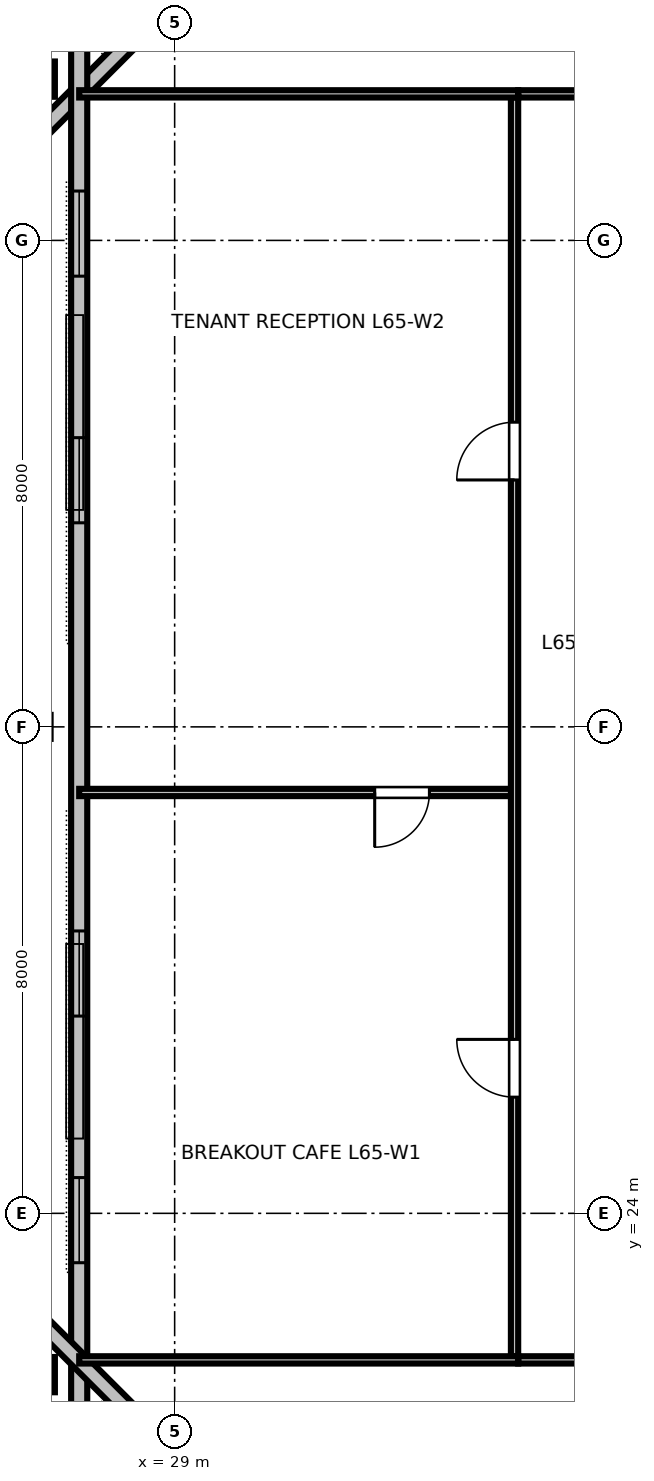
"""IFC4 building model, lengths in metres.
Left out: names, types, materials, properties, quantities, classifications, styles, units other than length and angle.
Written with IfcOpenShell. Run it as: python <this file> out.ifc"""

import sys

from ifc_helpers import new_model, si_unit, direction, frame, frame_2d, origin, origin_2d, place, context, subcontext, project, spatial, rectangle, hollow_rectangle, i_section, extrude, element, fill, save


model = new_model("IFC4")
c1 = context("Model", 3, precision=1e-05, world=origin(), true_north=direction((0.0, 1.0)))
c2 = subcontext(c1, "Body", "Model", "MODEL_VIEW")
j1 = project(units=[si_unit("LENGTHUNIT", "METRE"), si_unit("PLANEANGLEUNIT", "RADIAN")], contexts=[c1])
p1 = place(None, origin())
s1 = spatial("IfcSite", under=j1, at=p1, CompositionType="ELEMENT")
p2 = place(p1, origin())
s2 = spatial("IfcBuilding", under=s1, at=p2, CompositionType="ELEMENT")
p3 = place(p2, frame((0.0, 0.0, 246.6)))
s3 = spatial("IfcBuildingStorey", under=s2, at=p3, CompositionType="ELEMENT", Elevation=246.6)
p4 = place(p3, frame((26.68, 42.652, 0.0), z_axis=(0.177670579794, -0.155655183327, 0.971701923935), x_axis=(-0.730885754555, 0.640320734295, 0.236210438002)))
e1 = element("IfcColumn", 1, at=p4, inside=s3, PredefinedType="COLUMN", context=c2, shape_type="SweptSolid", body=[
    extrude(hollow_rectangle(XDim=0.58, YDim=0.7, WallThickness=0.032, at=origin_2d()), origin(), (0.0, 0.0, 1.0), 3.471),
])
p5 = place(p3, frame((26.77, 32.0, 0.0), z_axis=(0.178966909192, 0.0, 0.983855093708), x_axis=(-0.983855093708, 0.0, 0.178966909192)))
e2 = element("IfcColumn", 2, at=p5, inside=s3, PredefinedType="COLUMN", context=c2, shape_type="SweptSolid", body=[
    extrude(i_section(OverallWidth=0.395, OverallDepth=0.38, WebThickness=0.019, FlangeThickness=0.03, FilletRadius=0.025, at=origin_2d()), origin(), (0.0, 0.0, 1.0), 3.428),
])
p6 = place(p3, frame((26.68, 21.348, 0.0), z_axis=(0.177670579794, 0.155655183327, 0.971701923935), x_axis=(-0.730885754555, -0.640320734295, 0.236210438002)))
e3 = element("IfcColumn", 3, at=p6, inside=s3, PredefinedType="COLUMN", context=c2, shape_type="SweptSolid", body=[
    extrude(hollow_rectangle(XDim=0.58, YDim=0.7, WallThickness=0.032, at=origin_2d()), origin(), (0.0, 0.0, 1.0), 3.471),
])
p7 = place(p3, frame((34.396, 49.394, 0.0), z_axis=(0.0, 0.0, 1.0), x_axis=(-0.707106781187, -0.707106781187, 0.0)))
e4 = element("IfcWall", 4, at=p7, inside=s3, PredefinedType="STANDARD", context=c2, shape_type="SweptSolid", body=[
    extrude(rectangle(XDim=10.662, YDim=0.265, at=frame_2d((5.331, 0.0))), origin(), (0.0, 0.0, 1.0), 2.832),
])
p8 = place(p3, frame((27.43, 43.24, 0.0), z_axis=(0.0, 0.0, 1.0), x_axis=(0.0, -1.0, 0.0)))
e5 = element("IfcWall", 5, at=p8, inside=s3, PredefinedType="STANDARD", context=c2, shape_type="SweptSolid", body=[
    extrude(rectangle(XDim=22.48, YDim=0.265, at=frame_2d((11.24, 0.0))), origin(), (0.0, 0.0, 1.0), 2.832),
])
p9 = place(p8, frame((2.428, 0.0, 0.85)))
e6 = element("IfcOpeningElement", 6, at=p9, cuts=e5, PredefinedType="OPENING", context=c2, shape_type="SweptSolid", body=[
    extrude(rectangle(XDim=1.4, YDim=1.2, at=frame_2d((0.7, 0.6))), frame((0.0, 0.142, 0.0), z_axis=(0.0, -1.0, 0.0), x_axis=(1.0, 0.0, 0.0)), (0.0, 0.0, 1.0), 0.285),
])
p10 = place(p8, frame((6.484, 0.0, 0.85)))
e7 = element("IfcOpeningElement", 7, at=p10, cuts=e5, PredefinedType="OPENING", context=c2, shape_type="SweptSolid", body=[
    extrude(rectangle(XDim=1.4, YDim=1.2, at=frame_2d((0.7, 0.6))), frame((0.0, 0.142, 0.0), z_axis=(0.0, -1.0, 0.0), x_axis=(1.0, 0.0, 0.0)), (0.0, 0.0, 1.0), 0.285),
])
p11 = place(p8, frame((14.596, 0.0, 0.85)))
e8 = element("IfcOpeningElement", 8, at=p11, cuts=e5, PredefinedType="OPENING", context=c2, shape_type="SweptSolid", body=[
    extrude(rectangle(XDim=1.4, YDim=1.2, at=frame_2d((0.7, 0.6))), frame((0.0, 0.142, 0.0), z_axis=(0.0, -1.0, 0.0), x_axis=(1.0, 0.0, 0.0)), (0.0, 0.0, 1.0), 0.285),
])
p12 = place(p8, frame((18.652, 0.0, 0.85)))
e9 = element("IfcOpeningElement", 9, at=p12, cuts=e5, PredefinedType="OPENING", context=c2, shape_type="SweptSolid", body=[
    extrude(rectangle(XDim=1.4, YDim=1.2, at=frame_2d((0.7, 0.6))), frame((0.0, 0.142, 0.0), z_axis=(0.0, -1.0, 0.0), x_axis=(1.0, 0.0, 0.0)), (0.0, 0.0, 1.0), 0.285),
])
p13 = place(p3, frame((26.856, 22.146, 0.0), z_axis=(0.0, 0.0, 1.0), x_axis=(0.707106781187, -0.707106781187, 0.0)))
e10 = element("IfcWall", 10, at=p13, inside=s3, PredefinedType="STANDARD", context=c2, shape_type="SweptSolid", body=[
    extrude(rectangle(XDim=10.662, YDim=0.265, at=frame_2d((5.331, 0.0))), origin(), (0.0, 0.0, 1.0), 2.832),
])
p14 = place(p3, frame((34.65, 21.59, 0.0), z_axis=(0.0, 0.0, 1.0), x_axis=(1.0, 0.0, 0.0)))
e11 = element("IfcWall", 11, at=p14, inside=s3, PredefinedType="PARTITIONING", context=c2, shape_type="SweptSolid", body=[
    extrude(rectangle(XDim=10.33, YDim=0.12, at=frame_2d((5.165, 0.0))), origin(), (0.0, 0.0, 1.0), 2.655),
])
p15 = place(p14, frame((3.55, 0.0, 0.0)))
e12 = element("IfcOpeningElement", 12, at=p15, cuts=e11, PredefinedType="OPENING", context=c2, shape_type="SweptSolid", body=[
    extrude(rectangle(XDim=0.95, YDim=2.15, at=frame_2d((0.475, 1.075))), frame((0.0, 0.07, 0.0), z_axis=(0.0, -1.0, 0.0), x_axis=(1.0, 0.0, 0.0)), (0.0, 0.0, 1.0), 0.14),
])
p16 = place(p3, frame((34.65, 42.41, 0.0), z_axis=(0.0, 0.0, 1.0), x_axis=(1.0, 0.0, 0.0)))
e13 = element("IfcWall", 13, at=p16, inside=s3, PredefinedType="PARTITIONING", context=c2, shape_type="SweptSolid", body=[
    extrude(rectangle(XDim=10.33, YDim=0.12, at=frame_2d((5.165, 0.0))), origin(), (0.0, 0.0, 1.0), 2.655),
])
p17 = place(p16, frame((2.695, 0.0, 0.0)))
e14 = element("IfcOpeningElement", 14, at=p17, cuts=e13, PredefinedType="OPENING", context=c2, shape_type="SweptSolid", body=[
    extrude(rectangle(XDim=0.95, YDim=2.15, at=frame_2d((0.475, 1.075))), frame((0.0, 0.07, 0.0), z_axis=(0.0, -1.0, 0.0), x_axis=(1.0, 0.0, 0.0)), (0.0, 0.0, 1.0), 0.14),
])
p18 = place(p16, frame((7.79, 0.0, 0.0)))
e15 = element("IfcOpeningElement", 15, at=p18, cuts=e13, PredefinedType="OPENING", context=c2, shape_type="SweptSolid", body=[
    extrude(rectangle(XDim=0.95, YDim=2.15, at=frame_2d((0.475, 1.075))), frame((0.0, 0.07, 0.0), z_axis=(0.0, -1.0, 0.0), x_axis=(1.0, 0.0, 0.0)), (0.0, 0.0, 1.0), 0.14),
])
p19 = place(p3, frame((34.59, 30.921, 0.0), z_axis=(0.0, 0.0, 1.0), x_axis=(-1.0, 0.0, 0.0)))
e16 = element("IfcWall", 16, at=p19, inside=s3, PredefinedType="PARTITIONING", context=c2, shape_type="SweptSolid", body=[
    extrude(rectangle(XDim=7.16, YDim=0.12, at=frame_2d((3.58, 0.0))), origin(), (0.0, 0.0, 1.0), 2.655),
])
p20 = place(p19, frame((1.4, 0.0, 0.0)))
e17 = element("IfcOpeningElement", 17, at=p20, cuts=e16, PredefinedType="OPENING", context=c2, shape_type="SweptSolid", body=[
    extrude(rectangle(XDim=0.9, YDim=2.15, at=frame_2d((0.45, 1.075))), frame((0.0, 0.07, 0.0), z_axis=(0.0, -1.0, 0.0), x_axis=(1.0, 0.0, 0.0)), (0.0, 0.0, 1.0), 0.14),
])
p21 = place(p3, frame((34.59, 21.65, 0.0), z_axis=(0.0, 0.0, 1.0), x_axis=(0.0, 1.0, 0.0)))
e18 = element("IfcWall", 18, at=p21, inside=s3, PredefinedType="PARTITIONING", context=c2, shape_type="SweptSolid", body=[
    extrude(rectangle(XDim=20.7, YDim=0.12, at=frame_2d((10.35, 0.0))), origin(), (0.0, 0.0, 1.0), 2.655),
])
p22 = place(p21, frame((4.26, 0.0, 0.0)))
e19 = element("IfcOpeningElement", 19, at=p22, cuts=e18, PredefinedType="OPENING", context=c2, shape_type="SweptSolid", body=[
    extrude(rectangle(XDim=0.95, YDim=2.15, at=frame_2d((0.475, 1.075))), frame((0.0, 0.07, 0.0), z_axis=(0.0, -1.0, 0.0), x_axis=(1.0, 0.0, 0.0)), (0.0, 0.0, 1.0), 0.14),
])
p23 = place(p21, frame((14.411, 0.0, 0.0)))
e20 = element("IfcOpeningElement", 20, at=p23, cuts=e18, PredefinedType="OPENING", context=c2, shape_type="SweptSolid", body=[
    extrude(rectangle(XDim=0.95, YDim=2.15, at=frame_2d((0.475, 1.075))), frame((0.0, 0.07, 0.0), z_axis=(0.0, -1.0, 0.0), x_axis=(1.0, 0.0, 0.0)), (0.0, 0.0, 1.0), 0.14),
])
for number, where, z_axis, x_axis in (
    (21, (34.65, 21.59, 0.0), (0.0, 0.0, 1.0), (-1.0, 0.0, 0.0)),
    (22, (34.65, 42.41, 0.0), (0.0, 0.0, 1.0), (-1.0, 0.0, 0.0)),
):
    element("IfcWall", number, at=place(p3, frame(where, z_axis=z_axis, x_axis=x_axis)), inside=s3, PredefinedType="PARTITIONING", context=c2, shape_type="SweptSolid", body=[
        extrude(rectangle(XDim=7.22, YDim=0.12, at=frame_2d((3.61, 0.0))), origin(), (0.0, 0.0, 1.0), 2.655),
    ])
p24 = place(p9, origin())
e23 = element("IfcWindow", 23, at=p24, inside=s3, PartitioningType="SINGLE_PANEL", PredefinedType="WINDOW", context=c2, shape_type="SweptSolid", body=[
    extrude(rectangle(XDim=1.4, YDim=1.2, at=frame_2d((0.7, 0.6))), frame((0.0, 0.03, 0.0), z_axis=(0.0, -1.0, 0.0), x_axis=(1.0, 0.0, 0.0)), (0.0, 0.0, 1.0), 0.06),
])
fill(e6, e23)
p25 = place(p10, origin())
e24 = element("IfcWindow", 24, at=p25, inside=s3, PartitioningType="SINGLE_PANEL", PredefinedType="WINDOW", context=c2, shape_type="SweptSolid", body=[
    extrude(rectangle(XDim=1.4, YDim=1.2, at=frame_2d((0.7, 0.6))), frame((0.0, 0.03, 0.0), z_axis=(0.0, -1.0, 0.0), x_axis=(1.0, 0.0, 0.0)), (0.0, 0.0, 1.0), 0.06),
])
fill(e7, e24)
p26 = place(p11, origin())
e25 = element("IfcWindow", 25, at=p26, inside=s3, PartitioningType="SINGLE_PANEL", PredefinedType="WINDOW", context=c2, shape_type="SweptSolid", body=[
    extrude(rectangle(XDim=1.4, YDim=1.2, at=frame_2d((0.7, 0.6))), frame((0.0, 0.03, 0.0), z_axis=(0.0, -1.0, 0.0), x_axis=(1.0, 0.0, 0.0)), (0.0, 0.0, 1.0), 0.06),
])
fill(e8, e25)
p27 = place(p12, origin())
e26 = element("IfcWindow", 26, at=p27, inside=s3, PartitioningType="SINGLE_PANEL", PredefinedType="WINDOW", context=c2, shape_type="SweptSolid", body=[
    extrude(rectangle(XDim=1.4, YDim=1.2, at=frame_2d((0.7, 0.6))), frame((0.0, 0.03, 0.0), z_axis=(0.0, -1.0, 0.0), x_axis=(1.0, 0.0, 0.0)), (0.0, 0.0, 1.0), 0.06),
])
fill(e9, e26)
p28 = place(p20, origin())
e27 = element("IfcDoor", 27, at=p28, inside=s3, OperationType="SINGLE_SWING_RIGHT", PredefinedType="DOOR", context=c2, shape_type="SweptSolid", body=[
    extrude(rectangle(XDim=0.9, YDim=2.15, at=frame_2d((0.45, 1.075))), frame((0.0, 0.025, 0.0), z_axis=(0.0, -1.0, 0.0), x_axis=(1.0, 0.0, 0.0)), (0.0, 0.0, 1.0), 0.05),
])
fill(e17, e27)
p29 = place(p22, origin())
e28 = element("IfcDoor", 28, at=p29, inside=s3, OperationType="SINGLE_SWING_RIGHT", PredefinedType="DOOR", context=c2, shape_type="SweptSolid", body=[
    extrude(rectangle(XDim=0.95, YDim=2.15, at=frame_2d((0.475, 1.075))), frame((0.0, 0.025, 0.0), z_axis=(0.0, -1.0, 0.0), x_axis=(1.0, 0.0, 0.0)), (0.0, 0.0, 1.0), 0.05),
])
fill(e19, e28)
p30 = place(p23, origin())
e29 = element("IfcDoor", 29, at=p30, inside=s3, OperationType="SINGLE_SWING_LEFT", PredefinedType="DOOR", context=c2, shape_type="SweptSolid", body=[
    extrude(rectangle(XDim=0.95, YDim=2.15, at=frame_2d((0.475, 1.075))), frame((0.0, 0.025, 0.0), z_axis=(0.0, -1.0, 0.0), x_axis=(1.0, 0.0, 0.0)), (0.0, 0.0, 1.0), 0.05),
])
fill(e20, e29)
save(model, sys.argv[1])
